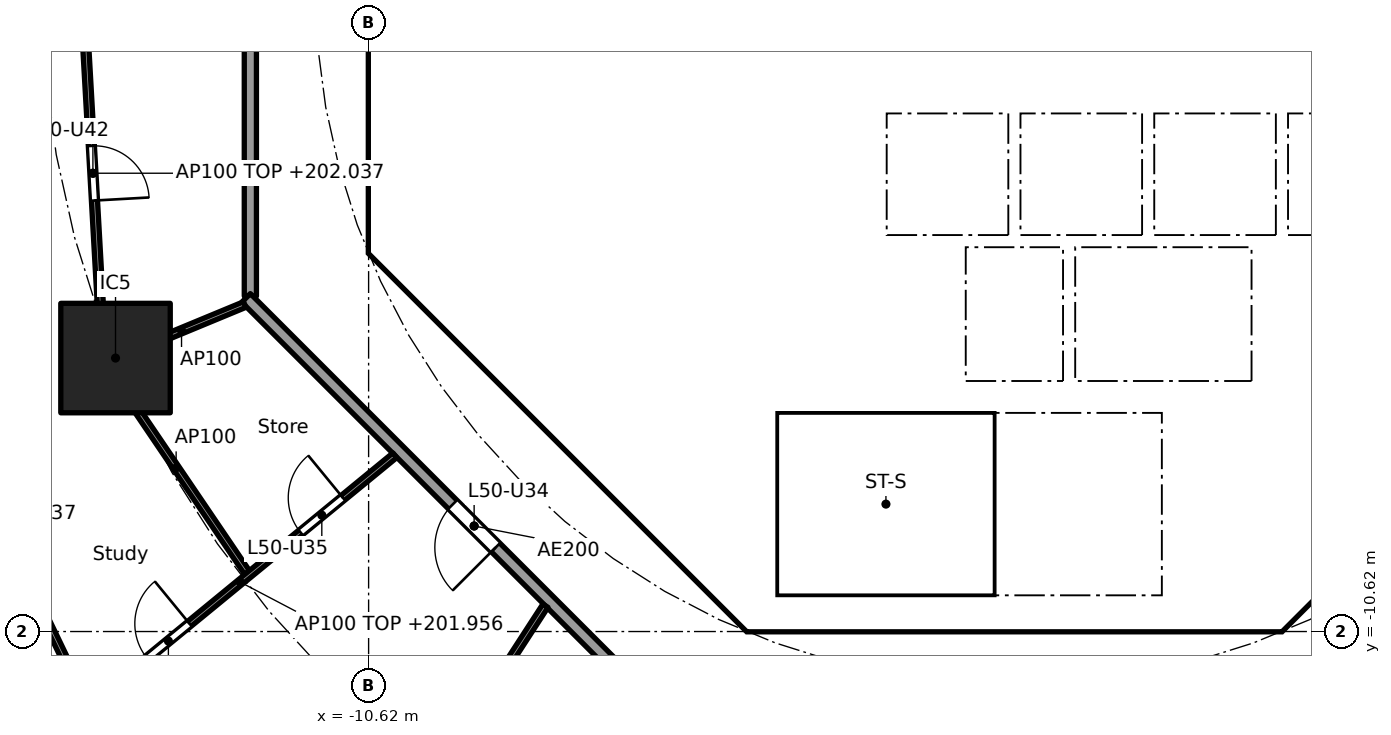
"""IFC4 building model, lengths in metres.
Left out: names, types, materials, properties, quantities, classifications, styles, units other than length and angle.
Written with IfcOpenShell. Run it as: python <this file> out.ifc"""

import sys

from ifc_helpers import new_model, si_unit, direction, frame, frame_2d, origin, origin_2d, place, context, subcontext, project, spatial, polyline, rectangle, outline, extrude, element, fill, save


model = new_model("IFC4")
c1 = context("Model", 3, precision=1e-05, world=origin(), true_north=direction((0.0, 1.0)))
c2 = subcontext(c1, "Body", "Model", "MODEL_VIEW")
j1 = project(units=[si_unit("LENGTHUNIT", "METRE"), si_unit("PLANEANGLEUNIT", "RADIAN")], contexts=[c1])
p1 = place(None, origin())
s1 = spatial("IfcSite", under=j1, at=p1, CompositionType="ELEMENT")
p2 = place(p1, origin())
s2 = spatial("IfcBuilding", under=s1, at=p2, CompositionType="ELEMENT")
p3 = place(p2, frame((0.0, 0.0, 199.2)))
s3 = spatial("IfcBuildingStorey", under=s2, at=p3, CompositionType="ELEMENT", Elevation=199.2)
p4 = place(p3, frame((-14.782, -6.123, 0.0), z_axis=(0.0, 0.0, 1.0), x_axis=(1.0, 0.0, 0.0)))
e1 = element("IfcColumn", 1, at=p4, inside=s3, PredefinedType="COLUMN", context=c2, shape_type="SweptSolid", body=[
    extrude(rectangle(XDim=1.8, YDim=1.8, at=origin_2d()), origin(), (0.0, 0.0, 1.0), 3.7),
])
p5 = place(p3, frame((-10.325, 3.801, 0.0), z_axis=(0.0, 0.0, 1.0), x_axis=(0.0, -1.0, 0.0)))
e2 = element("IfcWall", 2, at=p5, inside=s3, PredefinedType="SHEAR", context=c2, shape_type="SweptSolid", body=[
    extrude(rectangle(XDim=7.602, YDim=0.6, at=frame_2d((3.801, 0.0))), origin(), (0.0, 0.0, 1.0), 3.44),
])
p6 = place(p5, frame((0.651, 0.0, 0.0)))
e3 = element("IfcOpeningElement", 3, at=p6, cuts=e2, PredefinedType="OPENING", context=c2, shape_type="SweptSolid", body=[
    extrude(rectangle(XDim=1.5, YDim=2.1, at=frame_2d((0.75, 1.05))), frame((0.0, 0.31, 0.0), z_axis=(0.0, -1.0, 0.0), x_axis=(1.0, 0.0, 0.0)), (0.0, 0.0, 1.0), 0.62),
])
p7 = place(p5, frame((5.451, 0.0, 0.0)))
e4 = element("IfcOpeningElement", 4, at=p7, cuts=e2, PredefinedType="OPENING", context=c2, shape_type="SweptSolid", body=[
    extrude(rectangle(XDim=1.5, YDim=2.1, at=frame_2d((0.75, 1.05))), frame((0.0, 0.31, 0.0), z_axis=(0.0, -1.0, 0.0), x_axis=(1.0, 0.0, 0.0)), (0.0, 0.0, 1.0), 0.62),
])
p8 = place(p3, frame((-9.988, -4.613, 0.0), z_axis=(0.0, 0.0, 1.0), x_axis=(0.707106781187, -0.707106781187, 0.0)))
e5 = element("IfcWall", 5, at=p8, inside=s3, PredefinedType="SHEAR", context=c2, shape_type="SweptSolid", body=[
    extrude(rectangle(XDim=7.602, YDim=0.6, at=frame_2d((3.801, 0.0))), origin(), (0.0, 0.0, 1.0), 3.44),
])
p9 = place(p8, frame((6.151, 0.0, 0.0)))
e6 = element("IfcOpeningElement", 6, at=p9, cuts=e5, PredefinedType="OPENING", context=c2, shape_type="SweptSolid", body=[
    extrude(rectangle(XDim=1.1, YDim=2.1, at=frame_2d((0.55, 1.05))), frame((0.0, 0.31, 0.0), z_axis=(0.0, -1.0, 0.0), x_axis=(1.0, 0.0, 0.0)), (0.0, 0.0, 1.0), 0.62),
])
p10 = place(p3, frame((4.613, -9.988, 0.0), z_axis=(0.0, 0.0, 1.0), x_axis=(0.707106781187, 0.707106781187, 0.0)))
e7 = element("IfcWall", 7, at=p10, inside=s3, PredefinedType="SHEAR", context=c2, shape_type="SweptSolid", body=[
    extrude(rectangle(XDim=7.602, YDim=0.6, at=frame_2d((3.801, 0.0))), origin(), (0.0, 0.0, 1.0), 3.44),
])
p11 = place(p10, frame((3.201, 0.0, 0.0)))
e8 = element("IfcOpeningElement", 8, at=p11, cuts=e7, PredefinedType="OPENING", context=c2, shape_type="SweptSolid", body=[
    extrude(rectangle(XDim=1.2, YDim=2.1, at=frame_2d((0.6, 1.05))), frame((0.0, 0.31, 0.0), z_axis=(0.0, -1.0, 0.0), x_axis=(1.0, 0.0, 0.0)), (0.0, 0.0, 1.0), 0.62),
])
p12 = place(p3, frame((4.0, -10.025, 0.0), z_axis=(0.0, 0.0, 1.0), x_axis=(0.0, 1.0, 0.0)))
e9 = element("IfcWall", 9, at=p12, inside=s3, PredefinedType="SOLIDWALL", context=c2, shape_type="SweptSolid", body=[
    extrude(rectangle(XDim=3.0, YDim=0.2, at=frame_2d((1.5, 0.0))), origin(), (0.0, 0.0, 1.0), 3.44),
])
p13 = place(p12, frame((0.975, 0.0, 0.0)))
e10 = element("IfcOpeningElement", 10, at=p13, cuts=e9, PredefinedType="OPENING", context=c2, shape_type="SweptSolid", body=[
    extrude(rectangle(XDim=1.1, YDim=2.1, at=frame_2d((0.55, 1.05))), frame((0.0, 0.11, 0.0), z_axis=(0.0, -1.0, 0.0), x_axis=(1.0, 0.0, 0.0)), (0.0, 0.0, 1.0), 0.22),
])
p14 = place(p3, frame((-6.2, -7.827, 0.0), z_axis=(0.0, 0.0, 1.0), x_axis=(0.0, 1.0, 0.0)))
e11 = element("IfcWall", 11, at=p14, inside=s3, PredefinedType="PARTITIONING", context=c2, shape_type="SweptSolid", body=[
    extrude(rectangle(XDim=3.527, YDim=0.15, at=frame_2d((1.763, 0.0))), origin(), (0.0, 0.0, 1.0), 3.44),
])
p15 = place(p14, frame((2.365, 0.0, 0.0)))
e12 = element("IfcOpeningElement", 12, at=p15, cuts=e11, PredefinedType="OPENING", context=c2, shape_type="SweptSolid", body=[
    extrude(rectangle(XDim=0.9, YDim=2.1, at=frame_2d((0.45, 1.05))), frame((0.0, 0.085, 0.0), z_axis=(0.0, -1.0, 0.0), x_axis=(1.0, 0.0, 0.0)), (0.0, 0.0, 1.0), 0.17),
])
p16 = place(p14, frame((0.489, 0.0, 0.0)))
e13 = element("IfcOpeningElement", 13, at=p16, cuts=e11, PredefinedType="OPENING", context=c2, shape_type="SweptSolid", body=[
    extrude(rectangle(XDim=0.9, YDim=2.1, at=frame_2d((0.45, 1.05))), frame((0.0, 0.085, 0.0), z_axis=(0.0, -1.0, 0.0), x_axis=(1.0, 0.0, 0.0)), (0.0, 0.0, 1.0), 0.17),
])
p17 = place(p3, frame((4.0, -6.5, 0.0), z_axis=(0.0, 0.0, 1.0), x_axis=(0.0, 1.0, 0.0)))
e14 = element("IfcWall", 14, at=p17, inside=s3, PredefinedType="SOLIDWALL", context=c2, shape_type="SweptSolid", body=[
    extrude(rectangle(XDim=2.2, YDim=0.2, at=frame_2d((1.1, 0.0))), origin(), (0.0, 0.0, 1.0), 3.44),
])
p18 = place(p17, frame((0.55, 0.0, 0.0)))
e15 = element("IfcOpeningElement", 15, at=p18, cuts=e14, PredefinedType="OPENING", context=c2, shape_type="SweptSolid", body=[
    extrude(rectangle(XDim=1.1, YDim=2.1, at=frame_2d((0.55, 1.05))), frame((0.0, 0.11, 0.0), z_axis=(0.0, -1.0, 0.0), x_axis=(1.0, 0.0, 0.0)), (0.0, 0.0, 1.0), 0.22),
])
p19 = place(p3, frame((-4.0, -6.5, 0.0), z_axis=(0.0, 0.0, 1.0), x_axis=(0.0, 1.0, 0.0)))
e16 = element("IfcWall", 16, at=p19, inside=s3, PredefinedType="SOLIDWALL", context=c2, shape_type="SweptSolid", body=[
    extrude(rectangle(XDim=2.2, YDim=0.2, at=frame_2d((1.1, 0.0))), origin(), (0.0, 0.0, 1.0), 3.44),
])
p20 = place(p19, frame((0.65, 0.0, 0.0)))
e17 = element("IfcOpeningElement", 17, at=p20, cuts=e16, PredefinedType="OPENING", context=c2, shape_type="SweptSolid", body=[
    extrude(rectangle(XDim=0.9, YDim=2.1, at=frame_2d((0.45, 1.05))), frame((0.0, 0.11, 0.0), z_axis=(0.0, -1.0, 0.0), x_axis=(1.0, 0.0, 0.0)), (0.0, 0.0, 1.0), 0.22),
])
p21 = place(p3, frame((-6.7, -2.0, 0.0), z_axis=(0.0, 0.0, 1.0), x_axis=(1.0, 0.0, 0.0)))
e18 = element("IfcWall", 18, at=p21, inside=s3, PredefinedType="SOLIDWALL", context=c2, shape_type="SweptSolid", body=[
    extrude(rectangle(XDim=13.4, YDim=0.2, at=frame_2d((6.7, 0.0))), origin(), (0.0, 0.0, 1.0), 3.44),
])
p22 = place(p21, frame((5.05, 0.0, 0.0)))
e19 = element("IfcOpeningElement", 19, at=p22, cuts=e18, PredefinedType="OPENING", context=c2, shape_type="SweptSolid", body=[
    extrude(rectangle(XDim=1.1, YDim=2.1, at=frame_2d((0.55, 1.05))), frame((0.0, 0.11, 0.0), z_axis=(0.0, -1.0, 0.0), x_axis=(1.0, 0.0, 0.0)), (0.0, 0.0, 1.0), 0.22),
])
p23 = place(p21, frame((7.25, 0.0, 0.0)))
e20 = element("IfcOpeningElement", 20, at=p23, cuts=e18, PredefinedType="OPENING", context=c2, shape_type="SweptSolid", body=[
    extrude(rectangle(XDim=1.1, YDim=2.1, at=frame_2d((0.55, 1.05))), frame((0.0, 0.11, 0.0), z_axis=(0.0, -1.0, 0.0), x_axis=(1.0, 0.0, 0.0)), (0.0, 0.0, 1.0), 0.22),
])
p24 = place(p21, frame((0.75, 0.0, 0.0)))
e21 = element("IfcOpeningElement", 21, at=p24, cuts=e18, PredefinedType="OPENING", context=c2, shape_type="SweptSolid", body=[
    extrude(rectangle(XDim=0.9, YDim=2.1, at=frame_2d((0.45, 1.05))), frame((0.0, 0.11, 0.0), z_axis=(0.0, -1.0, 0.0), x_axis=(1.0, 0.0, 0.0)), (0.0, 0.0, 1.0), 0.22),
])
p25 = place(p21, frame((2.95, 0.0, 0.0)))
e22 = element("IfcOpeningElement", 22, at=p25, cuts=e18, PredefinedType="OPENING", context=c2, shape_type="SweptSolid", body=[
    extrude(rectangle(XDim=0.9, YDim=2.1, at=frame_2d((0.45, 1.05))), frame((0.0, 0.11, 0.0), z_axis=(0.0, -1.0, 0.0), x_axis=(1.0, 0.0, 0.0)), (0.0, 0.0, 1.0), 0.22),
])
p26 = place(p3, origin())
e23 = element("IfcWall", 23, at=p26, inside=s3, PredefinedType="SHEAR", context=c2, shape_type="SweptSolid", body=[
    extrude(outline(polyline([(-10.625, -3.801), (-10.025, -3.801), (-10.025, -4.152), (-9.776, -4.401), (-10.2, -4.825), (-10.625, -4.401), (-10.625, -3.801)])), origin(), (0.0, 0.0, 1.0), 3.44),
])
p27 = place(p3, origin())
e24 = element("IfcWall", 24, at=p27, inside=s3, PredefinedType="SHEAR", context=c2, shape_type="SweptSolid", body=[
    extrude(outline(polyline([(-4.152, -10.025), (4.152, -10.025), (4.401, -9.776), (4.825, -10.2), (4.401, -10.625), (-4.401, -10.625), (-4.825, -10.2), (-4.401, -9.776), (-4.152, -10.025)])), origin(), (0.0, 0.0, 1.0), 3.44),
])
for number, where, z_axis, x_axis in (
    (25, (-0.9, -6.5, 0.0), (0.0, 0.0, 1.0), (0.0, 1.0, 0.0)),
    (26, (0.9, -6.5, 0.0), (0.0, 0.0, 1.0), (0.0, 1.0, 0.0)),
):
    element("IfcWall", number, at=place(p3, frame(where, z_axis=z_axis, x_axis=x_axis)), inside=s3, PredefinedType="SOLIDWALL", context=c2, shape_type="SweptSolid", body=[
        extrude(rectangle(XDim=2.2, YDim=0.2, at=frame_2d((1.1, 0.0))), origin(), (0.0, 0.0, 1.0), 3.44),
    ])
p28 = place(p3, origin())
e27 = element("IfcWall", 27, at=p28, inside=s3, PredefinedType="SOLIDWALL", context=c2, shape_type="SweptSolid", body=[
    extrude(outline(polyline([(-6.7, -2.1), (-6.5, -2.1), (-6.5, -4.1), (-4.5, -4.1), (-4.5, -2.1), (-4.3, -2.1), (-4.3, -4.1), (-2.3, -4.1), (-2.3, -2.1), (-2.1, -2.1), (-2.1, -4.1), (-0.1, -4.1), (-0.1, -2.1), (0.1, -2.1), (0.1, -4.1), (2.1, -4.1), (2.1, -2.1), (2.3, -2.1), (2.3, -4.1), (4.3, -4.1), (4.3, -2.1), (4.5, -2.1), (4.5, -4.1), (6.5, -4.1), (6.5, -2.1), (6.7, -2.1), (6.7, -4.3), (-6.7, -4.3), (-6.7, -2.1)])), origin(), (0.0, 0.0, 1.0), 3.44),
])
p29 = place(p3, frame((-10.025, -4.0, 0.0), z_axis=(0.0, 0.0, 1.0), x_axis=(1.0, 0.0, 0.0)))
e28 = element("IfcWall", 28, at=p29, inside=s3, PredefinedType="PARTITIONING", context=c2, shape_type="SweptSolid", body=[
    extrude(rectangle(XDim=3.325, YDim=0.2, at=frame_2d((1.662, 0.0))), origin(), (0.0, 0.0, 1.0), 3.44),
])
p30 = place(p3, frame((-8.301, -5.8, 0.0), z_axis=(0.0, 0.0, 1.0), x_axis=(1.0, 0.0, 0.0)))
e29 = element("IfcWall", 29, at=p30, inside=s3, PredefinedType="PARTITIONING", context=c2, shape_type="SweptSolid", body=[
    extrude(rectangle(XDim=2.026, YDim=0.15, at=frame_2d((1.013, 0.0))), origin(), (0.0, 0.0, 1.0), 3.44),
])
p31 = place(p3, origin())
e30 = element("IfcWall", 30, at=p31, inside=s3, PredefinedType="SOLIDWALL", context=c2, shape_type="SweptSolid", body=[
    extrude(outline(polyline([(-3.9, -10.025), (-4.1, -10.025), (-4.1, -7.025), (-3.9, -7.025), (-3.9, -10.025)])), origin(), (0.0, 0.0, 1.0), 3.44),
])
p32 = place(p3, origin())
e31 = element("IfcWall", 31, at=p32, inside=s3, PredefinedType="SOLIDWALL", context=c2, shape_type="SweptSolid", body=[
    extrude(outline(polyline([(4.1, -7.025), (-4.1, -7.025), (-4.1, -6.5), (4.1, -6.5), (4.1, -7.025)])), origin(), (0.0, 0.0, 1.0), 3.44),
])
p33 = place(p3, frame((-12.565, 5.304, 0.0), z_axis=(0.0, 0.0, 1.0), x_axis=(0.0, -1.0, 0.0)))
e32 = element("IfcWall", 32, at=p33, inside=s3, PredefinedType="PARTITIONING", context=c2, shape_type="SweptSolid", body=[
    extrude(rectangle(XDim=10.409, YDim=0.2, at=frame_2d((5.205, 0.0))), origin(), (0.0, 0.0, 1.0), 3.44),
])
p34 = place(p3, frame((-12.635, -5.134, 0.0), z_axis=(0.0, 0.0, 1.0), x_axis=(0.707106781187, -0.707106781187, 0.0)))
e33 = element("IfcWall", 33, at=p34, inside=s3, PredefinedType="PARTITIONING", context=c2, shape_type="SweptSolid", body=[
    extrude(rectangle(XDim=10.609, YDim=0.2, at=frame_2d((5.305, 0.0))), origin(), (0.0, 0.0, 1.0), 3.44),
])
p35 = place(p34, frame((4.804, 0.0, 0.0)))
e34 = element("IfcOpeningElement", 34, at=p35, cuts=e33, PredefinedType="OPENING", context=c2, shape_type="SweptSolid", body=[
    extrude(rectangle(XDim=1.0, YDim=2.1, at=frame_2d((0.5, 1.05))), frame((0.0, 0.11, 0.0), z_axis=(0.0, -1.0, 0.0), x_axis=(1.0, 0.0, 0.0)), (0.0, 0.0, 1.0), 0.22),
])
p36 = place(p3, frame((-15.331, 0.05, 0.0), z_axis=(0.0, 0.0, 1.0), x_axis=(0.056325291522, -0.998412470643, 0.0)))
e35 = element("IfcWall", 35, at=p36, inside=s3, PredefinedType="PARTITIONING", context=c2, shape_type="SweptSolid", body=[
    extrude(rectangle(XDim=6.276, YDim=0.1, at=frame_2d((3.138, 0.0))), origin(), (0.0, 0.0, 1.0), 2.837),
])
p37 = place(p36, frame((2.688, 0.0, 0.0)))
e36 = element("IfcOpeningElement", 36, at=p37, cuts=e35, PredefinedType="OPENING", context=c2, shape_type="SweptSolid", body=[
    extrude(rectangle(XDim=0.9, YDim=2.1, at=frame_2d((0.45, 1.05))), frame((0.0, 0.06, 0.0), z_axis=(0.0, -1.0, 0.0), x_axis=(1.0, 0.0, 0.0)), (0.0, 0.0, 1.0), 0.12),
])
p38 = place(p3, frame((-12.657, -5.243, 0.0), z_axis=(0.0, 0.0, 1.0), x_axis=(-0.923864733477, -0.382719158442, 0.0)))
e37 = element("IfcWall", 37, at=p38, inside=s3, PredefinedType="PARTITIONING", context=c2, shape_type="SweptSolid", body=[
    extrude(rectangle(XDim=2.25, YDim=0.1, at=frame_2d((1.125, 0.0))), origin(), (0.0, 0.0, 1.0), 3.44),
])
p39 = place(p3, frame((-14.952, -6.208, 0.0), z_axis=(0.0, 0.0, 1.0), x_axis=(0.561064907171, -0.827771810308, 0.0)))
e38 = element("IfcWall", 38, at=p39, inside=s3, PredefinedType="PARTITIONING", context=c2, shape_type="SweptSolid", body=[
    extrude(rectangle(XDim=4.159, YDim=0.1, at=frame_2d((2.079, 0.0))), origin(), (0.0, 0.0, 1.0), 3.44),
])
p40 = place(p3, frame((-17.669, -6.809, 0.0), z_axis=(0.0, 0.0, 1.0), x_axis=(0.434040130629, -0.900893536997, 0.0)))
e39 = element("IfcWall", 39, at=p40, inside=s3, PredefinedType="PARTITIONING", context=c2, shape_type="SweptSolid", body=[
    extrude(rectangle(XDim=5.558, YDim=0.1, at=frame_2d((2.779, 0.0))), origin(), (0.0, 0.0, 1.0), 3.44),
])
p41 = place(p3, frame((-10.189, -7.721, 0.0), z_axis=(0.0, 0.0, 1.0), x_axis=(-0.773121441079, -0.634258021112, 0.0)))
e40 = element("IfcWall", 40, at=p41, inside=s3, PredefinedType="PARTITIONING", context=c2, shape_type="SweptSolid", body=[
    extrude(rectangle(XDim=6.577, YDim=0.1, at=frame_2d((3.289, 0.0))), origin(), (0.0, 0.0, 1.0), 2.756),
])
p42 = place(p41, frame((1.104, 0.0, 0.0)))
e41 = element("IfcOpeningElement", 41, at=p42, cuts=e40, PredefinedType="OPENING", context=c2, shape_type="SweptSolid", body=[
    extrude(rectangle(XDim=0.9, YDim=2.1, at=frame_2d((0.45, 1.05))), frame((0.0, 0.06, 0.0), z_axis=(0.0, -1.0, 0.0), x_axis=(1.0, 0.0, 0.0)), (0.0, 0.0, 1.0), 0.12),
])
p43 = place(p41, frame((4.367, 0.0, 0.0)))
e42 = element("IfcOpeningElement", 42, at=p43, cuts=e40, PredefinedType="OPENING", context=c2, shape_type="SweptSolid", body=[
    extrude(rectangle(XDim=0.9, YDim=2.1, at=frame_2d((0.45, 1.05))), frame((0.0, 0.06, 0.0), z_axis=(0.0, -1.0, 0.0), x_axis=(1.0, 0.0, 0.0)), (0.0, 0.0, 1.0), 0.12),
])
p44 = place(p3, frame((-7.712, -10.195, 0.0), z_axis=(0.0, 0.0, 1.0), x_axis=(-0.544179442551, -0.838968851809, 0.0)))
e43 = element("IfcWall", 43, at=p44, inside=s3, PredefinedType="PARTITIONING", context=c2, shape_type="SweptSolid", body=[
    extrude(rectangle(XDim=7.566, YDim=0.1, at=frame_2d((3.783, 0.0))), origin(), (0.0, 0.0, 1.0), 2.756),
])
p45 = place(p44, frame((1.343, 0.0, 0.0)))
e44 = element("IfcOpeningElement", 44, at=p45, cuts=e43, PredefinedType="OPENING", context=c2, shape_type="SweptSolid", body=[
    extrude(rectangle(XDim=0.9, YDim=2.1, at=frame_2d((0.45, 1.05))), frame((0.0, 0.06, 0.0), z_axis=(0.0, -1.0, 0.0), x_axis=(1.0, 0.0, 0.0)), (0.0, 0.0, 1.0), 0.12),
])
p46 = place(p44, frame((5.101, 0.0, 0.0)))
e45 = element("IfcOpeningElement", 45, at=p46, cuts=e43, PredefinedType="OPENING", context=c2, shape_type="SweptSolid", body=[
    extrude(rectangle(XDim=0.9, YDim=2.1, at=frame_2d((0.45, 1.05))), frame((0.0, 0.06, 0.0), z_axis=(0.0, -1.0, 0.0), x_axis=(1.0, 0.0, 0.0)), (0.0, 0.0, 1.0), 0.12),
])
p47 = place(p22, origin())
e46 = element("IfcDoor", 46, at=p47, inside=s3, OperationType="DOUBLE_DOOR_SLIDING", PredefinedType="DOOR", context=c2, shape_type="SweptSolid", body=[
    extrude(rectangle(XDim=1.1, YDim=2.1, at=frame_2d((0.55, 1.05))), frame((0.0, 0.025, 0.0), z_axis=(0.0, -1.0, 0.0), x_axis=(1.0, 0.0, 0.0)), (0.0, 0.0, 1.0), 0.05),
])
fill(e19, e46)
p48 = place(p23, origin())
e47 = element("IfcDoor", 47, at=p48, inside=s3, OperationType="DOUBLE_DOOR_SLIDING", PredefinedType="DOOR", context=c2, shape_type="SweptSolid", body=[
    extrude(rectangle(XDim=1.1, YDim=2.1, at=frame_2d((0.55, 1.05))), frame((0.0, 0.025, 0.0), z_axis=(0.0, -1.0, 0.0), x_axis=(1.0, 0.0, 0.0)), (0.0, 0.0, 1.0), 0.05),
])
fill(e20, e47)
p49 = place(p18, origin())
e48 = element("IfcDoor", 48, at=p49, inside=s3, OperationType="DOUBLE_DOOR_SLIDING", PredefinedType="DOOR", context=c2, shape_type="SweptSolid", body=[
    extrude(rectangle(XDim=1.1, YDim=2.1, at=frame_2d((0.55, 1.05))), frame((0.0, 0.025, 0.0), z_axis=(0.0, -1.0, 0.0), x_axis=(1.0, 0.0, 0.0)), (0.0, 0.0, 1.0), 0.05),
])
fill(e15, e48)
p50 = place(p13, origin())
e49 = element("IfcDoor", 49, at=p50, inside=s3, OperationType="SINGLE_SWING_LEFT", PredefinedType="DOOR", context=c2, shape_type="SweptSolid", body=[
    extrude(rectangle(XDim=1.1, YDim=2.1, at=frame_2d((0.55, 1.05))), frame((0.0, 0.025, 0.0), z_axis=(0.0, -1.0, 0.0), x_axis=(1.0, 0.0, 0.0)), (0.0, 0.0, 1.0), 0.05),
])
fill(e10, e49)
p51 = place(p15, origin())
e50 = element("IfcDoor", 50, at=p51, inside=s3, OperationType="SINGLE_SWING_LEFT", PredefinedType="DOOR", context=c2, shape_type="SweptSolid", body=[
    extrude(rectangle(XDim=0.9, YDim=2.1, at=frame_2d((0.45, 1.05))), frame((0.0, 0.025, 0.0), z_axis=(0.0, -1.0, 0.0), x_axis=(1.0, 0.0, 0.0)), (0.0, 0.0, 1.0), 0.05),
])
fill(e12, e50)
p52 = place(p16, origin())
e51 = element("IfcDoor", 51, at=p52, inside=s3, OperationType="SINGLE_SWING_LEFT", PredefinedType="DOOR", context=c2, shape_type="SweptSolid", body=[
    extrude(rectangle(XDim=0.9, YDim=2.1, at=frame_2d((0.45, 1.05))), frame((0.0, 0.025, 0.0), z_axis=(0.0, -1.0, 0.0), x_axis=(1.0, 0.0, 0.0)), (0.0, 0.0, 1.0), 0.05),
])
fill(e13, e51)
p53 = place(p20, frame((0.9, 0.0, 0.0), x_axis=(-1.0, 0.0, 0.0)))
e52 = element("IfcDoor", 52, at=p53, inside=s3, OperationType="SINGLE_SWING_RIGHT", PredefinedType="DOOR", context=c2, shape_type="SweptSolid", body=[
    extrude(rectangle(XDim=0.9, YDim=2.1, at=frame_2d((0.45, 1.05))), frame((0.0, 0.025, 0.0), z_axis=(0.0, -1.0, 0.0), x_axis=(1.0, 0.0, 0.0)), (0.0, 0.0, 1.0), 0.05),
])
fill(e17, e52)
p54 = place(p24, frame((0.9, 0.0, 0.0), x_axis=(-1.0, 0.0, 0.0)))
e53 = element("IfcDoor", 53, at=p54, inside=s3, OperationType="SINGLE_SWING_LEFT", PredefinedType="DOOR", context=c2, shape_type="SweptSolid", body=[
    extrude(rectangle(XDim=0.9, YDim=2.1, at=frame_2d((0.45, 1.05))), frame((0.0, 0.025, 0.0), z_axis=(0.0, -1.0, 0.0), x_axis=(1.0, 0.0, 0.0)), (0.0, 0.0, 1.0), 0.05),
])
fill(e21, e53)
p55 = place(p25, frame((0.9, 0.0, 0.0), x_axis=(-1.0, 0.0, 0.0)))
e54 = element("IfcDoor", 54, at=p55, inside=s3, OperationType="SINGLE_SWING_LEFT", PredefinedType="DOOR", context=c2, shape_type="SweptSolid", body=[
    extrude(rectangle(XDim=0.9, YDim=2.1, at=frame_2d((0.45, 1.05))), frame((0.0, 0.025, 0.0), z_axis=(0.0, -1.0, 0.0), x_axis=(1.0, 0.0, 0.0)), (0.0, 0.0, 1.0), 0.05),
])
fill(e22, e54)
p56 = place(p7, origin())
e55 = element("IfcDoor", 55, at=p56, inside=s3, OperationType="DOUBLE_DOOR_SINGLE_SWING", PredefinedType="DOOR", context=c2, shape_type="SweptSolid", body=[
    extrude(rectangle(XDim=1.5, YDim=2.1, at=frame_2d((0.75, 1.05))), frame((0.0, 0.025, 0.0), z_axis=(0.0, -1.0, 0.0), x_axis=(1.0, 0.0, 0.0)), (0.0, 0.0, 1.0), 0.05),
])
fill(e4, e55)
p57 = place(p9, origin())
e56 = element("IfcDoor", 56, at=p57, inside=s3, OperationType="SINGLE_SWING_RIGHT", PredefinedType="DOOR", context=c2, shape_type="SweptSolid", body=[
    extrude(rectangle(XDim=1.1, YDim=2.1, at=frame_2d((0.55, 1.05))), frame((0.0, 0.025, 0.0), z_axis=(0.0, -1.0, 0.0), x_axis=(1.0, 0.0, 0.0)), (0.0, 0.0, 1.0), 0.05),
])
fill(e6, e56)
p58 = place(p35, frame((1.0, 0.0, 0.0), x_axis=(-1.0, 0.0, 0.0)))
e57 = element("IfcDoor", 57, at=p58, inside=s3, OperationType="SINGLE_SWING_LEFT", PredefinedType="DOOR", context=c2, shape_type="SweptSolid", body=[
    extrude(rectangle(XDim=1.0, YDim=2.1, at=frame_2d((0.5, 1.05))), frame((0.0, 0.025, 0.0), z_axis=(0.0, -1.0, 0.0), x_axis=(1.0, 0.0, 0.0)), (0.0, 0.0, 1.0), 0.05),
])
fill(e34, e57)
p59 = place(p42, frame((0.9, 0.0, 0.0), x_axis=(-1.0, 0.0, 0.0)))
e58 = element("IfcDoor", 58, at=p59, inside=s3, OperationType="SINGLE_SWING_RIGHT", PredefinedType="DOOR", context=c2, shape_type="SweptSolid", body=[
    extrude(rectangle(XDim=0.9, YDim=2.1, at=frame_2d((0.45, 1.05))), frame((0.0, 0.025, 0.0), z_axis=(0.0, -1.0, 0.0), x_axis=(1.0, 0.0, 0.0)), (0.0, 0.0, 1.0), 0.05),
])
fill(e41, e58)
p60 = place(p43, frame((0.9, 0.0, 0.0), x_axis=(-1.0, 0.0, 0.0)))
e59 = element("IfcDoor", 59, at=p60, inside=s3, OperationType="SINGLE_SWING_RIGHT", PredefinedType="DOOR", context=c2, shape_type="SweptSolid", body=[
    extrude(rectangle(XDim=0.9, YDim=2.1, at=frame_2d((0.45, 1.05))), frame((0.0, 0.025, 0.0), z_axis=(0.0, -1.0, 0.0), x_axis=(1.0, 0.0, 0.0)), (0.0, 0.0, 1.0), 0.05),
])
fill(e42, e59)
p61 = place(p37, origin())
e60 = element("IfcDoor", 60, at=p61, inside=s3, OperationType="SINGLE_SWING_RIGHT", PredefinedType="DOOR", context=c2, shape_type="SweptSolid", body=[
    extrude(rectangle(XDim=0.9, YDim=2.1, at=frame_2d((0.45, 1.05))), frame((0.0, 0.025, 0.0), z_axis=(0.0, -1.0, 0.0), x_axis=(1.0, 0.0, 0.0)), (0.0, 0.0, 1.0), 0.05),
])
fill(e36, e60)
save(model, sys.argv[1])
